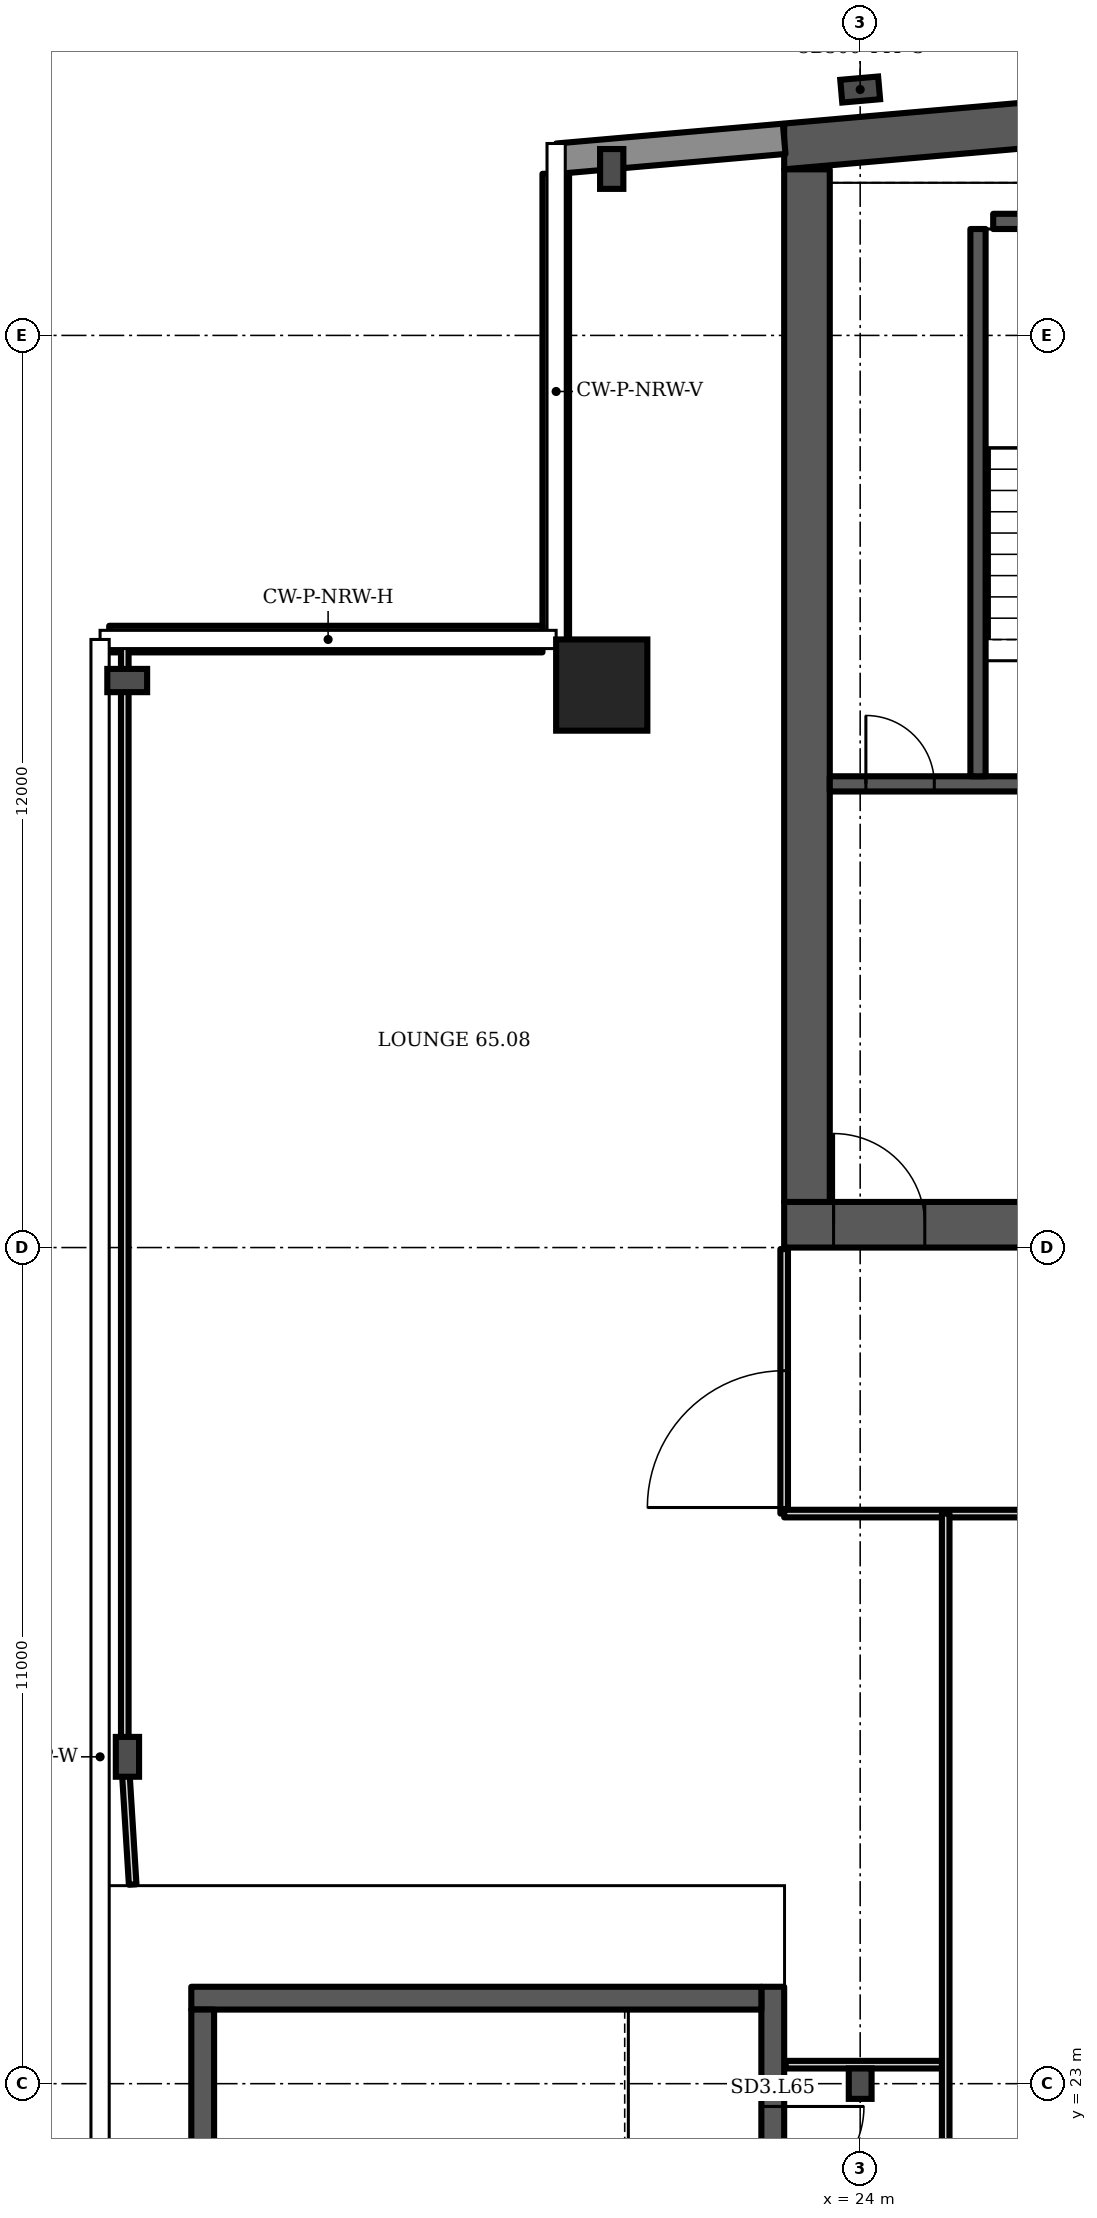
"""IFC4 building model, lengths in metres.
Left out: names, types, materials, properties, quantities, classifications, styles, units other than length and angle.
Written with IfcOpenShell. Run it as: python <this file> out.ifc"""

import sys

from ifc_helpers import new_model, si_unit, direction, frame, frame_2d, origin, origin_2d, place, context, subcontext, project, spatial, polyline, rectangle, i_section, outline, extrude, element, fill, save


model = new_model("IFC4")
c1 = context("Model", 3, precision=1e-05, world=origin(), true_north=direction((0.0, 1.0)))
c2 = subcontext(c1, "Body", "Model", "MODEL_VIEW")
j1 = project(units=[si_unit("LENGTHUNIT", "METRE"), si_unit("PLANEANGLEUNIT", "RADIAN")], contexts=[c1])
p1 = place(None, origin())
s1 = spatial("IfcSite", under=j1, at=p1, CompositionType="ELEMENT")
p2 = place(p1, origin())
s2 = spatial("IfcBuilding", under=s1, at=p2, CompositionType="ELEMENT")
p3 = place(p2, frame((0.0, 0.0, 257.5)))
s3 = spatial("IfcBuildingStorey", under=s2, at=p3, CompositionType="ELEMENT", Elevation=257.5)
p4 = place(p3, origin())
e1 = element("IfcWall", 1, at=p4, inside=s3, PredefinedType="SHEAR", context=c2, shape_type="SweptSolid", body=[
    extrude(outline(polyline([(23.0, 48.185), (40.5, 49.716), (58.0, 48.185), (58.0, 48.787), (40.5, 50.318), (23.0, 48.787), (23.0, 48.185)])), origin(), (0.0, 0.0, 1.0), 3.6),
])
p5 = place(p3, frame((23.0, 34.3, 0.0), z_axis=(0.0, 0.0, 1.0), x_axis=(1.0, 0.0, 0.0)))
e2 = element("IfcWall", 2, at=p5, inside=s3, PredefinedType="SHEAR", context=c2, shape_type="SweptSolid", body=[
    extrude(rectangle(XDim=35.0, YDim=0.6, at=frame_2d((17.5, 0.0))), origin(), (0.0, 0.0, 1.0), 3.6),
])
p6 = place(p5, frame((0.65, 0.0, 0.0)))
e3 = element("IfcOpeningElement", 3, at=p6, cuts=e2, PredefinedType="OPENING", context=c2, shape_type="SweptSolid", body=[
    extrude(rectangle(XDim=1.2, YDim=2.1, at=frame_2d((0.6, 1.05))), frame((0.0, 0.31, 0.0), z_axis=(0.0, -1.0, 0.0), x_axis=(1.0, 0.0, 0.0)), (0.0, 0.0, 1.0), 0.62),
])
p7 = place(p5, frame((7.717, 0.0, 0.0)))
e4 = element("IfcOpeningElement", 4, at=p7, cuts=e2, PredefinedType="OPENING", context=c2, shape_type="SweptSolid", body=[
    extrude(rectangle(XDim=1.1, YDim=2.1, at=frame_2d((0.55, 1.05))), frame((0.0, 0.31, 0.0), z_axis=(0.0, -1.0, 0.0), x_axis=(1.0, 0.0, 0.0)), (0.0, 0.0, 1.0), 0.62),
])
p8 = place(p5, frame((12.183, 0.0, 0.0)))
e5 = element("IfcOpeningElement", 5, at=p8, cuts=e2, PredefinedType="OPENING", context=c2, shape_type="SweptSolid", body=[
    extrude(rectangle(XDim=1.1, YDim=2.1, at=frame_2d((0.55, 1.05))), frame((0.0, 0.31, 0.0), z_axis=(0.0, -1.0, 0.0), x_axis=(1.0, 0.0, 0.0)), (0.0, 0.0, 1.0), 0.62),
])
p9 = place(p5, frame((9.8, 0.0, 0.0)))
e6 = element("IfcOpeningElement", 6, at=p9, cuts=e2, PredefinedType="OPENING", context=c2, shape_type="SweptSolid", body=[
    extrude(rectangle(XDim=1.4, YDim=2.1, at=frame_2d((0.7, 1.05))), frame((0.0, 0.31, 0.0), z_axis=(0.0, -1.0, 0.0), x_axis=(1.0, 0.0, 0.0)), (0.0, 0.0, 1.0), 0.62),
])
p10 = place(p5, frame((14.717, 0.0, 0.0)))
e7 = element("IfcOpeningElement", 7, at=p10, cuts=e2, PredefinedType="OPENING", context=c2, shape_type="SweptSolid", body=[
    extrude(rectangle(XDim=1.1, YDim=2.1, at=frame_2d((0.55, 1.05))), frame((0.0, 0.31, 0.0), z_axis=(0.0, -1.0, 0.0), x_axis=(1.0, 0.0, 0.0)), (0.0, 0.0, 1.0), 0.62),
])
p11 = place(p5, frame((16.95, 0.0, 0.0)))
e8 = element("IfcOpeningElement", 8, at=p11, cuts=e2, PredefinedType="OPENING", context=c2, shape_type="SweptSolid", body=[
    extrude(rectangle(XDim=1.1, YDim=2.1, at=frame_2d((0.55, 1.05))), frame((0.0, 0.31, 0.0), z_axis=(0.0, -1.0, 0.0), x_axis=(1.0, 0.0, 0.0)), (0.0, 0.0, 1.0), 0.62),
])
p12 = place(p5, frame((19.183, 0.0, 0.0)))
e9 = element("IfcOpeningElement", 9, at=p12, cuts=e2, PredefinedType="OPENING", context=c2, shape_type="SweptSolid", body=[
    extrude(rectangle(XDim=1.1, YDim=2.1, at=frame_2d((0.55, 1.05))), frame((0.0, 0.31, 0.0), z_axis=(0.0, -1.0, 0.0), x_axis=(1.0, 0.0, 0.0)), (0.0, 0.0, 1.0), 0.62),
])
p13 = place(p5, frame((26.15, 0.0, 0.0)))
e10 = element("IfcOpeningElement", 10, at=p13, cuts=e2, PredefinedType="OPENING", context=c2, shape_type="SweptSolid", body=[
    extrude(rectangle(XDim=1.2, YDim=2.1, at=frame_2d((0.6, 1.05))), frame((0.0, 0.31, 0.0), z_axis=(0.0, -1.0, 0.0), x_axis=(1.0, 0.0, 0.0)), (0.0, 0.0, 1.0), 0.62),
])
p14 = place(p5, frame((30.8, 0.0, 0.0)))
e11 = element("IfcOpeningElement", 11, at=p14, cuts=e2, PredefinedType="OPENING", context=c2, shape_type="SweptSolid", body=[
    extrude(rectangle(XDim=1.4, YDim=2.1, at=frame_2d((0.7, 1.05))), frame((0.0, 0.31, 0.0), z_axis=(0.0, -1.0, 0.0), x_axis=(1.0, 0.0, 0.0)), (0.0, 0.0, 1.0), 0.62),
])
p15 = place(p3, frame((23.3, 34.6, 0.0), z_axis=(0.0, 0.0, 1.0), x_axis=(0.0, 1.0, 0.0)))
e12 = element("IfcWall", 12, at=p15, inside=s3, PredefinedType="SHEAR", context=c2, shape_type="SweptSolid", body=[
    extrude(rectangle(XDim=13.585, YDim=0.6, at=frame_2d((6.792, 0.0))), origin(), (0.0, 0.0, 1.0), 3.6),
])
p16 = place(p3, frame((20.6, 41.4, 0.0), z_axis=(0.0, 0.0, 1.0), x_axis=(1.0, 0.0, 0.0)))
e13 = element("IfcColumn", 13, at=p16, inside=s3, PredefinedType="COLUMN", context=c2, shape_type="SweptSolid", body=[
    extrude(rectangle(XDim=1.2, YDim=1.2, at=origin_2d()), origin(), (0.0, 0.0, 1.0), 3.6),
])
for number, where, z_axis, x_axis in (
    (14, (20.731, 48.19, 0.0), (0.0, 0.0, 1.0), (-1.0, 0.0, 0.0)),
    (15, (14.357, 41.46, 0.0), (0.0, 0.0, 1.0), (0.0, 1.0, 0.0)),
    (16, (14.36, 27.3, 0.0), (0.0, 0.0, 1.0), (-1.0, 0.0, 0.0)),
):
    element("IfcColumn", number, at=place(p3, frame(where, z_axis=z_axis, x_axis=x_axis)), inside=s3, PredefinedType="COLUMN", context=c2, shape_type="SweptSolid", body=[
        extrude(i_section(OverallWidth=0.306, OverallDepth=0.524, WebThickness=0.021, FlangeThickness=0.04, FilletRadius=0.027, at=origin_2d()), origin(), (0.0, 0.0, 1.0), 3.6),
    ])
p17 = place(p3, frame((24.0, 23.0, 0.0), z_axis=(0.0, 0.0, 1.0), x_axis=(1.0, 0.0, 0.0)))
e17 = element("IfcColumn", 17, at=p17, inside=s3, PredefinedType="COLUMN", context=c2, shape_type="SweptSolid", body=[
    extrude(i_section(OverallWidth=0.3, OverallDepth=0.4, WebThickness=0.013, FlangeThickness=0.024, FilletRadius=0.027, at=origin_2d()), origin(), (0.0, 0.0, 1.0), 3.6),
])
p18 = place(p3, frame((24.0, 49.235, 0.0), z_axis=(0.0, 0.0, 1.0), x_axis=(-0.087156, 0.996197, 0.0)))
e18 = element("IfcColumn", 18, at=p18, inside=s3, PredefinedType="COLUMN", context=c2, shape_type="SweptSolid", body=[
    extrude(i_section(OverallWidth=0.3, OverallDepth=0.5, WebThickness=0.014, FlangeThickness=0.028, FilletRadius=0.027, at=origin_2d()), origin(), (0.0, 0.0, 1.0), 3.6),
])
p19 = place(p3, frame((23.0, 48.587, 0.0), z_axis=(0.0, 0.0, 1.0), x_axis=(-0.996194, -0.087168, 0.0)))
e19 = element("IfcWall", 19, at=p19, inside=s3, PredefinedType="SOLIDWALL", context=c2, shape_type="SweptSolid", body=[
    extrude(rectangle(XDim=2.994, YDim=0.4, at=frame_2d((1.497, 0.0))), origin(), (0.0, 0.0, 1.0), 3.2),
])
p20 = place(p3, frame((19.995, 48.126, 0.0), z_axis=(0.0, 0.0, 1.0), x_axis=(0.0, -1.0, 0.0)))
e20 = element("IfcWall", 20, at=p20, inside=s3, PredefinedType="SOLIDWALL", context=c2, shape_type="SweptSolid", body=[
    extrude(rectangle(XDim=6.126, YDim=0.35, at=frame_2d((3.063, 0.0))), origin(), (0.0, 0.0, 1.0), 1.0),
])
p21 = place(p3, frame((19.82, 42.005, 0.0), z_axis=(0.0, 0.0, 1.0), x_axis=(-1.0, 0.0, 0.0)))
e21 = element("IfcWall", 21, at=p21, inside=s3, PredefinedType="SOLIDWALL", context=c2, shape_type="SweptSolid", body=[
    extrude(rectangle(XDim=5.7, YDim=0.35, at=frame_2d((2.85, 0.0))), origin(), (0.0, 0.0, 1.0), 1.0),
])
p22 = place(p3, frame((23.6, 40.1, 0.0), z_axis=(0.0, 0.0, 1.0), x_axis=(1.0, 0.0, 0.0)))
e22 = element("IfcWall", 22, at=p22, inside=s3, PredefinedType="SHEAR", context=c2, shape_type="SweptSolid", body=[
    extrude(rectangle(XDim=6.1, YDim=0.2, at=frame_2d((3.05, 0.0))), origin(), (0.0, 0.0, 1.0), 3.2),
])
p23 = place(p22, frame((3.325, 0.0, 0.0)))
e23 = element("IfcOpeningElement", 23, at=p23, cuts=e22, PredefinedType="OPENING", context=c2, shape_type="SweptSolid", body=[
    extrude(rectangle(XDim=1.2, YDim=2.1, at=frame_2d((0.6, 1.05))), frame((0.0, 0.11, 0.0), z_axis=(0.0, -1.0, 0.0), x_axis=(1.0, 0.0, 0.0)), (0.0, 0.0, 1.0), 0.22),
])
p24 = place(p22, frame((0.475, 0.0, 0.0)))
e24 = element("IfcOpeningElement", 24, at=p24, cuts=e22, PredefinedType="OPENING", context=c2, shape_type="SweptSolid", body=[
    extrude(rectangle(XDim=0.9, YDim=2.1, at=frame_2d((0.45, 1.05))), frame((0.0, 0.11, 0.0), z_axis=(0.0, -1.0, 0.0), x_axis=(1.0, 0.0, 0.0)), (0.0, 0.0, 1.0), 0.22),
])
p25 = place(p3, frame((25.55, 40.2, 0.0), z_axis=(0.0, 0.0, 1.0), x_axis=(0.0, 1.0, 0.0)))
e25 = element("IfcWall", 25, at=p25, inside=s3, PredefinedType="SHEAR", context=c2, shape_type="SweptSolid", body=[
    extrude(rectangle(XDim=7.2, YDim=0.2, at=frame_2d((3.6, 0.0))), origin(), (0.0, 0.0, 1.0), 3.2),
])
p26 = place(p3, frame((25.75, 47.5, 0.0), z_axis=(0.0, 0.0, 1.0), x_axis=(1.0, 0.0, 0.0)))
e26 = element("IfcWall", 26, at=p26, inside=s3, PredefinedType="SHEAR", context=c2, shape_type="SweptSolid", body=[
    extrude(rectangle(XDim=3.95, YDim=0.2, at=frame_2d((1.975, 0.0))), origin(), (0.0, 0.0, 1.0), 3.2),
])
p27 = place(p3, frame((22.85, 19.925, 0.0), z_axis=(0.0, 0.0, 1.0), x_axis=(0.0, 1.0, 0.0)))
e27 = element("IfcWall", 27, at=p27, inside=s3, PredefinedType="SHEAR", context=c2, shape_type="SweptSolid", body=[
    extrude(rectangle(XDim=4.35, YDim=0.3, at=frame_2d((2.175, 0.0))), origin(), (0.0, 0.0, 1.0), 3.2),
])
p28 = place(p27, frame((1.575, 0.0, 0.0)))
e28 = element("IfcOpeningElement", 28, at=p28, cuts=e27, PredefinedType="OPENING", context=c2, shape_type="SweptSolid", body=[
    extrude(rectangle(XDim=1.2, YDim=2.1, at=frame_2d((0.6, 1.05))), frame((0.0, 0.16, 0.0), z_axis=(0.0, -1.0, 0.0), x_axis=(1.0, 0.0, 0.0)), (0.0, 0.0, 1.0), 0.32),
])
p29 = place(p3, frame((14.325, 27.3, 0.0), z_axis=(0.0, 0.0, 1.0), x_axis=(0.0, 1.0, 0.0)))
e29 = element("IfcWall", 29, at=p29, inside=s3, PredefinedType="PARTITIONING", context=c2, shape_type="SweptSolid", body=[
    extrude(rectangle(XDim=14.68, YDim=0.1, at=frame_2d((7.34, 0.0))), origin(), (0.0, 0.0, 1.0), 2.494),
])
p30 = place(p3, frame((14.429, 25.62, 0.0), z_axis=(0.0, 0.0, 1.0), x_axis=(-0.061647, 0.998101, 0.0)))
e30 = element("IfcWall", 30, at=p30, inside=s3, PredefinedType="PARTITIONING", context=c2, shape_type="SweptSolid", body=[
    extrude(rectangle(XDim=1.683, YDim=0.1, at=frame_2d((0.842, 0.0))), origin(), (0.0, 0.0, 1.0), 2.502),
])
p31 = place(p3, frame((23.0, 30.5, 0.0), z_axis=(0.0, 0.0, 1.0), x_axis=(0.0, 1.0, 0.0)))
e31 = element("IfcWall", 31, at=p31, inside=s3, PredefinedType="PARTITIONING", context=c2, shape_type="SweptSolid", body=[
    extrude(rectangle(XDim=3.48, YDim=0.1, at=frame_2d((1.74, 0.0))), origin(), (0.0, 0.0, 1.0), 3.2),
])
p32 = place(p31, frame((0.08, 0.0, 0.0)))
e32 = element("IfcOpeningElement", 32, at=p32, cuts=e31, PredefinedType="OPENING", context=c2, shape_type="SweptSolid", body=[
    extrude(rectangle(XDim=1.8, YDim=2.1, at=frame_2d((0.9, 1.05))), frame((0.0, 0.06, 0.0), z_axis=(0.0, -1.0, 0.0), x_axis=(1.0, 0.0, 0.0)), (0.0, 0.0, 1.0), 0.12),
])
p33 = place(p3, frame((23.0, 30.5, 0.0), z_axis=(0.0, 0.0, 1.0), x_axis=(1.0, 0.0, 0.0)))
e33 = element("IfcWall", 33, at=p33, inside=s3, PredefinedType="PARTITIONING", context=c2, shape_type="SweptSolid", body=[
    extrude(rectangle(XDim=13.85, YDim=0.1, at=frame_2d((6.925, 0.0))), origin(), (0.0, 0.0, 1.0), 3.2),
])
p34 = place(p33, frame((7.545, 0.0, 0.0)))
e34 = element("IfcOpeningElement", 34, at=p34, cuts=e33, PredefinedType="OPENING", context=c2, shape_type="SweptSolid", body=[
    extrude(rectangle(XDim=1.0, YDim=2.1, at=frame_2d((0.5, 1.05))), frame((0.0, 0.06, 0.0), z_axis=(0.0, -1.0, 0.0), x_axis=(1.0, 0.0, 0.0)), (0.0, 0.0, 1.0), 0.12),
])
p35 = place(p3, frame((23.02, 23.25, 0.0), z_axis=(0.0, 0.0, 1.0), x_axis=(1.0, 0.0, 0.0)))
e35 = element("IfcWall", 35, at=p35, inside=s3, PredefinedType="PARTITIONING", context=c2, shape_type="SweptSolid", body=[
    extrude(rectangle(XDim=2.105, YDim=0.1, at=frame_2d((1.052, 0.0))), origin(), (0.0, 0.0, 1.0), 3.2),
])
p36 = place(p3, frame((25.125, 19.35, 0.0), z_axis=(0.0, 0.0, 1.0), x_axis=(0.0, 1.0, 0.0)))
e36 = element("IfcWall", 36, at=p36, inside=s3, PredefinedType="PARTITIONING", context=c2, shape_type="SweptSolid", body=[
    extrude(rectangle(XDim=11.15, YDim=0.1, at=frame_2d((5.575, 0.0))), origin(), (0.0, 0.0, 1.0), 3.2),
])
p37 = place(p3, frame((15.2, 24.125, 0.0), z_axis=(0.0, 0.0, 1.0), x_axis=(1.0, 0.0, 0.0)))
e37 = element("IfcWall", 37, at=p37, inside=s3, PredefinedType="SHEAR", context=c2, shape_type="SweptSolid", body=[
    extrude(rectangle(XDim=7.5, YDim=0.3, at=frame_2d((3.75, 0.0))), origin(), (0.0, 0.0, 1.0), 3.2),
])
p38 = place(p3, frame((15.35, 20.225, 0.0), z_axis=(0.0, 0.0, 1.0), x_axis=(0.0, 1.0, 0.0)))
e38 = element("IfcWall", 38, at=p38, inside=s3, PredefinedType="SHEAR", context=c2, shape_type="SweptSolid", body=[
    extrude(rectangle(XDim=3.75, YDim=0.3, at=frame_2d((1.875, 0.0))), origin(), (0.0, 0.0, 1.0), 3.2),
])
p39 = place(p24, origin())
e39 = element("IfcDoor", 39, at=p39, inside=s3, OperationType="SINGLE_SWING_LEFT", PredefinedType="DOOR", context=c2, shape_type="SweptSolid", body=[
    extrude(rectangle(XDim=0.9, YDim=2.1, at=frame_2d((0.45, 1.05))), frame((0.0, 0.025, 0.0), z_axis=(0.0, -1.0, 0.0), x_axis=(1.0, 0.0, 0.0)), (0.0, 0.0, 1.0), 0.05),
])
fill(e24, e39)
p40 = place(p6, origin())
e40 = element("IfcDoor", 40, at=p40, inside=s3, OperationType="SINGLE_SWING_LEFT", PredefinedType="DOOR", context=c2, shape_type="SweptSolid", body=[
    extrude(rectangle(XDim=1.2, YDim=2.1, at=frame_2d((0.6, 1.05))), frame((0.0, 0.025, 0.0), z_axis=(0.0, -1.0, 0.0), x_axis=(1.0, 0.0, 0.0)), (0.0, 0.0, 1.0), 0.05),
])
fill(e3, e40)
p41 = place(p28, origin())
e41 = element("IfcDoor", 41, at=p41, inside=s3, OperationType="SINGLE_SWING_RIGHT", PredefinedType="DOOR", context=c2, shape_type="SweptSolid", body=[
    extrude(rectangle(XDim=1.2, YDim=2.1, at=frame_2d((0.6, 1.05))), frame((0.0, 0.025, 0.0), z_axis=(0.0, -1.0, 0.0), x_axis=(1.0, 0.0, 0.0)), (0.0, 0.0, 1.0), 0.05),
])
fill(e28, e41)
p42 = place(p32, origin())
e42 = element("IfcDoor", 42, at=p42, inside=s3, OperationType="DOUBLE_DOOR_SINGLE_SWING", PredefinedType="DOOR", context=c2, shape_type="SweptSolid", body=[
    extrude(rectangle(XDim=1.8, YDim=2.1, at=frame_2d((0.9, 1.05))), frame((0.0, 0.025, 0.0), z_axis=(0.0, -1.0, 0.0), x_axis=(1.0, 0.0, 0.0)), (0.0, 0.0, 1.0), 0.05),
])
fill(e32, e42)
save(model, sys.argv[1])
